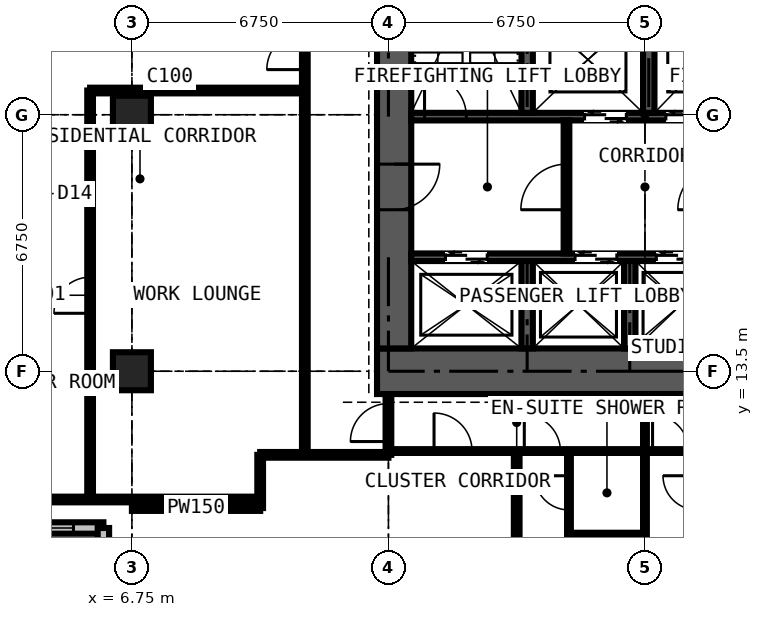
"""IFC4 building model, lengths in metres.
Left out: names, types, materials, properties, quantities, classifications, styles, units other than length and angle.
Written with IfcOpenShell. Run it as: python <this file> out.ifc"""

import sys

from ifc_helpers import new_model, si_unit, direction, frame, frame_2d, origin, origin_2d, place, context, subcontext, project, spatial, rectangle, extrude, element, fill, save


model = new_model("IFC4")
c1 = context("Model", 3, precision=1e-05, world=origin(), true_north=direction((0.0, 1.0)))
c2 = subcontext(c1, "Body", "Model", "MODEL_VIEW")
j1 = project(units=[si_unit("LENGTHUNIT", "METRE"), si_unit("PLANEANGLEUNIT", "RADIAN")], contexts=[c1])
p1 = place(None, origin())
s1 = spatial("IfcSite", under=j1, at=p1, CompositionType="ELEMENT")
p2 = place(p1, origin())
s2 = spatial("IfcBuilding", under=s1, at=p2, CompositionType="ELEMENT")
p3 = place(p2, frame((0.0, 0.0, 233.1)))
s3 = spatial("IfcBuildingStorey", under=s2, at=p3, CompositionType="ELEMENT", Elevation=233.1)
for number, where, z_axis, x_axis in (
    (1, (6.75, 13.5, 0.0), (0.0, 0.0, 1.0), (1.0, 0.0, 0.0)),
    (2, (6.75, 20.25, 0.0), (0.0, 0.0, 1.0), (1.0, 0.0, 0.0)),
):
    element("IfcColumn", number, at=place(p3, frame(where, z_axis=z_axis, x_axis=x_axis)), inside=s3, PredefinedType="COLUMN", context=c2, shape_type="SweptSolid", body=[
        extrude(rectangle(XDim=1.0, YDim=1.0, at=origin_2d()), origin(), (0.0, 0.0, 1.0), 3.6),
    ])
p4 = place(p3, frame((13.2, 13.5, 0.0), z_axis=(0.0, 0.0, 1.0), x_axis=(1.0, 0.0, 0.0)))
e3 = element("IfcWall", 3, at=p4, inside=s3, PredefinedType="SHEAR", context=c2, shape_type="SweptSolid", body=[
    extrude(rectangle(XDim=14.1, YDim=1.2, at=frame_2d((7.05, 0.0))), origin(), (0.0, 0.0, 1.0), 3.6),
])
p5 = place(p3, frame((13.65, 26.4, 0.0), z_axis=(0.0, 0.0, 1.0), x_axis=(0.0, -1.0, 0.0)))
e4 = element("IfcWall", 4, at=p5, inside=s3, PredefinedType="SHEAR", context=c2, shape_type="SweptSolid", body=[
    extrude(rectangle(XDim=12.3, YDim=0.9, at=frame_2d((6.15, 0.0))), origin(), (0.0, 0.0, 1.0), 3.6),
])
p6 = place(p5, frame((7.45, 0.0, 0.0)))
e5 = element("IfcOpeningElement", 5, at=p6, cuts=e4, PredefinedType="OPENING", context=c2, shape_type="SweptSolid", body=[
    extrude(rectangle(XDim=1.2, YDim=2.2, at=frame_2d((0.6, 1.1))), frame((0.0, 0.46, 0.0), z_axis=(0.0, -1.0, 0.0), x_axis=(1.0, 0.0, 0.0)), (0.0, 0.0, 1.0), 0.92),
])
p7 = place(p3, frame((2.625, 9.375, 0.0), z_axis=(0.0, 0.0, 1.0), x_axis=(1.0, 0.0, 0.0)))
e6 = element("IfcWall", 6, at=p7, inside=s3, PredefinedType="SOLIDWALL", context=c2, shape_type="SweptSolid", body=[
    extrude(rectangle(XDim=3.375, YDim=0.3, at=frame_2d((1.688, 0.0))), origin(), (0.0, 0.0, 1.0), 3.375),
])
p8 = place(p7, frame((0.788, 0.0, 0.6)))
e7 = element("IfcOpeningElement", 7, at=p8, cuts=e6, PredefinedType="OPENING", context=c2, shape_type="SweptSolid", body=[
    extrude(rectangle(XDim=1.8, YDim=2.1, at=frame_2d((0.9, 1.05))), frame((0.0, 0.16, 0.0), z_axis=(0.0, -1.0, 0.0), x_axis=(1.0, 0.0, 0.0)), (0.0, 0.0, 1.0), 0.32),
])
p9 = place(p3, frame((6.0, 9.375, 0.0), z_axis=(0.0, 0.0, 1.0), x_axis=(0.0, -1.0, 0.0)))
e8 = element("IfcWall", 8, at=p9, inside=s3, PredefinedType="SOLIDWALL", context=c2, shape_type="SweptSolid", body=[
    extrude(rectangle(XDim=3.375, YDim=0.3, at=frame_2d((1.688, 0.0))), origin(), (0.0, 0.0, 1.0), 3.375),
])
p10 = place(p9, frame((0.788, 0.0, 0.6)))
e9 = element("IfcOpeningElement", 9, at=p10, cuts=e8, PredefinedType="OPENING", context=c2, shape_type="SweptSolid", body=[
    extrude(rectangle(XDim=1.8, YDim=2.1, at=frame_2d((0.9, 1.05))), frame((0.0, 0.16, 0.0), z_axis=(0.0, -1.0, 0.0), x_axis=(1.0, 0.0, 0.0)), (0.0, 0.0, 1.0), 0.32),
])
p11 = place(p3, frame((14.1, 16.5, 0.0), z_axis=(0.0, 0.0, 1.0), x_axis=(1.0, 0.0, 0.0)))
e10 = element("IfcWall", 10, at=p11, inside=s3, PredefinedType="SHEAR", context=c2, shape_type="SweptSolid", body=[
    extrude(rectangle(XDim=12.3, YDim=0.2, at=frame_2d((6.15, 0.0))), origin(), (0.0, 0.0, 1.0), 3.6),
])
p12 = place(p11, frame((0.9, 0.0, 0.0)))
e11 = element("IfcOpeningElement", 11, at=p12, cuts=e10, PredefinedType="OPENING", context=c2, shape_type="SweptSolid", body=[
    extrude(rectangle(XDim=1.1, YDim=2.2, at=frame_2d((0.55, 1.1))), frame((0.0, 0.11, 0.0), z_axis=(0.0, -1.0, 0.0), x_axis=(1.0, 0.0, 0.0)), (0.0, 0.0, 1.0), 0.22),
])
p13 = place(p11, frame((4.31, 0.0, 0.0)))
e12 = element("IfcOpeningElement", 12, at=p13, cuts=e10, PredefinedType="OPENING", context=c2, shape_type="SweptSolid", body=[
    extrude(rectangle(XDim=1.1, YDim=2.2, at=frame_2d((0.55, 1.1))), frame((0.0, 0.11, 0.0), z_axis=(0.0, -1.0, 0.0), x_axis=(1.0, 0.0, 0.0)), (0.0, 0.0, 1.0), 0.22),
])
p14 = place(p11, frame((6.45, 0.0, 0.0)))
e13 = element("IfcOpeningElement", 13, at=p14, cuts=e10, PredefinedType="OPENING", context=c2, shape_type="SweptSolid", body=[
    extrude(rectangle(XDim=1.1, YDim=2.2, at=frame_2d((0.55, 1.1))), frame((0.0, 0.11, 0.0), z_axis=(0.0, -1.0, 0.0), x_axis=(1.0, 0.0, 0.0)), (0.0, 0.0, 1.0), 0.22),
])
p15 = place(p11, frame((9.5, 0.0, 0.0)))
e14 = element("IfcOpeningElement", 14, at=p15, cuts=e10, PredefinedType="OPENING", context=c2, shape_type="SweptSolid", body=[
    extrude(rectangle(XDim=1.1, YDim=2.2, at=frame_2d((0.55, 1.1))), frame((0.0, 0.11, 0.0), z_axis=(0.0, -1.0, 0.0), x_axis=(1.0, 0.0, 0.0)), (0.0, 0.0, 1.0), 0.22),
])
p16 = place(p3, frame((14.1, 20.2, 0.0), z_axis=(0.0, 0.0, 1.0), x_axis=(1.0, 0.0, 0.0)))
e15 = element("IfcWall", 15, at=p16, inside=s3, PredefinedType="SHEAR", context=c2, shape_type="SweptSolid", body=[
    extrude(rectangle(XDim=12.3, YDim=0.2, at=frame_2d((6.15, 0.0))), origin(), (0.0, 0.0, 1.0), 3.6),
])
p17 = place(p16, frame((4.56, 0.0, 0.0)))
e16 = element("IfcOpeningElement", 16, at=p17, cuts=e15, PredefinedType="OPENING", context=c2, shape_type="SweptSolid", body=[
    extrude(rectangle(XDim=1.1, YDim=2.2, at=frame_2d((0.55, 1.1))), frame((0.0, 0.11, 0.0), z_axis=(0.0, -1.0, 0.0), x_axis=(1.0, 0.0, 0.0)), (0.0, 0.0, 1.0), 0.22),
])
p18 = place(p16, frame((6.7, 0.0, 0.0)))
e17 = element("IfcOpeningElement", 17, at=p18, cuts=e15, PredefinedType="OPENING", context=c2, shape_type="SweptSolid", body=[
    extrude(rectangle(XDim=1.1, YDim=2.2, at=frame_2d((0.55, 1.1))), frame((0.0, 0.11, 0.0), z_axis=(0.0, -1.0, 0.0), x_axis=(1.0, 0.0, 0.0)), (0.0, 0.0, 1.0), 0.22),
])
p19 = place(p16, frame((0.35, 0.0, 0.0)))
e18 = element("IfcOpeningElement", 18, at=p19, cuts=e15, PredefinedType="OPENING", context=c2, shape_type="SweptSolid", body=[
    extrude(rectangle(XDim=1.1, YDim=2.2, at=frame_2d((0.55, 1.1))), frame((0.0, 0.11, 0.0), z_axis=(0.0, -1.0, 0.0), x_axis=(1.0, 0.0, 0.0)), (0.0, 0.0, 1.0), 0.22),
])
p20 = place(p16, frame((9.75, 0.0, 0.0)))
e19 = element("IfcOpeningElement", 19, at=p20, cuts=e15, PredefinedType="OPENING", context=c2, shape_type="SweptSolid", body=[
    extrude(rectangle(XDim=1.1, YDim=2.2, at=frame_2d((0.55, 1.1))), frame((0.0, 0.11, 0.0), z_axis=(0.0, -1.0, 0.0), x_axis=(1.0, 0.0, 0.0)), (0.0, 0.0, 1.0), 0.22),
])
p21 = place(p3, frame((17.15, 20.3, 0.0), z_axis=(0.0, 0.0, 1.0), x_axis=(0.0, 1.0, 0.0)))
e20 = element("IfcWall", 20, at=p21, inside=s3, PredefinedType="SHEAR", context=c2, shape_type="SweptSolid", body=[
    extrude(rectangle(XDim=6.1, YDim=0.3, at=frame_2d((3.05, 0.0))), origin(), (0.0, 0.0, 1.0), 3.6),
])
p22 = place(p3, frame((20.35, 20.3, 0.0), z_axis=(0.0, 0.0, 1.0), x_axis=(0.0, 1.0, 0.0)))
e21 = element("IfcWall", 21, at=p22, inside=s3, PredefinedType="SHEAR", context=c2, shape_type="SweptSolid", body=[
    extrude(rectangle(XDim=2.8, YDim=0.3, at=frame_2d((1.4, 0.0))), origin(), (0.0, 0.0, 1.0), 3.6),
])
for number, where, z_axis, x_axis in (
    (22, (17.15, 14.1, 0.0), (0.0, 0.0, 1.0), (0.0, 1.0, 0.0)),
    (23, (19.85, 14.1, 0.0), (0.0, 0.0, 1.0), (0.0, 1.0, 0.0)),
):
    element("IfcWall", number, at=place(p3, frame(where, z_axis=z_axis, x_axis=x_axis)), inside=s3, PredefinedType="SHEAR", context=c2, shape_type="SweptSolid", body=[
        extrude(rectangle(XDim=2.3, YDim=0.3, at=frame_2d((1.15, 0.0))), origin(), (0.0, 0.0, 1.0), 3.6),
    ])
p23 = place(p3, frame((18.185, 16.6, 0.0), z_axis=(0.0, 0.0, 1.0), x_axis=(0.0, 1.0, 0.0)))
e24 = element("IfcWall", 24, at=p23, inside=s3, PredefinedType="PARTITIONING", context=c2, shape_type="SweptSolid", body=[
    extrude(rectangle(XDim=3.5, YDim=0.15, at=frame_2d((1.75, 0.0))), origin(), (0.0, 0.0, 1.0), 3.375),
])
p24 = place(p23, frame((1.15, 0.0, 0.0)))
e25 = element("IfcOpeningElement", 25, at=p24, cuts=e24, PredefinedType="OPENING", context=c2, shape_type="SweptSolid", body=[
    extrude(rectangle(XDim=1.2, YDim=2.2, at=frame_2d((0.6, 1.1))), frame((0.0, 0.085, 0.0), z_axis=(0.0, -1.0, 0.0), x_axis=(1.0, 0.0, 0.0)), (0.0, 0.0, 1.0), 0.17),
])
p25 = place(p3, frame((2.775, 10.125, 0.0), z_axis=(0.0, 0.0, 1.0), x_axis=(1.0, 0.0, 0.0)))
e26 = element("IfcWall", 26, at=p25, inside=s3, PredefinedType="PARTITIONING", context=c2, shape_type="SweptSolid", body=[
    extrude(rectangle(XDim=7.35, YDim=0.15, at=frame_2d((3.675, 0.0))), origin(), (0.0, 0.0, 1.0), 2.877),
])
p26 = place(p3, frame((5.65, 10.125, 0.0), z_axis=(0.0, 0.0, 1.0), x_axis=(0.0, 1.0, 0.0)))
e27 = element("IfcWall", 27, at=p26, inside=s3, PredefinedType="PARTITIONING", context=c2, shape_type="SweptSolid", body=[
    extrude(rectangle(XDim=10.762, YDim=0.15, at=frame_2d((5.381, 0.0))), origin(), (0.0, 0.0, 1.0), 3.375),
])
p27 = place(p26, frame((4.9, 0.0, 0.0)))
e28 = element("IfcOpeningElement", 28, at=p27, cuts=e27, PredefinedType="OPENING", context=c2, shape_type="SweptSolid", body=[
    extrude(rectangle(XDim=0.95, YDim=2.2, at=frame_2d((0.475, 1.1))), frame((0.0, 0.085, 0.0), z_axis=(0.0, -1.0, 0.0), x_axis=(1.0, 0.0, 0.0)), (0.0, 0.0, 1.0), 0.17),
])
p28 = place(p3, frame((5.65, 20.887, 0.0), z_axis=(0.0, 0.0, 1.0), x_axis=(1.0, 0.0, 0.0)))
e29 = element("IfcWall", 29, at=p28, inside=s3, PredefinedType="PARTITIONING", context=c2, shape_type="SweptSolid", body=[
    extrude(rectangle(XDim=5.65, YDim=0.15, at=frame_2d((2.825, 0.0))), origin(), (0.0, 0.0, 1.0), 3.375),
])
p29 = place(p3, frame((6.75, 9.9, 0.0), z_axis=(0.0, 0.0, 1.0), x_axis=(1.0, 0.0, 0.0)))
e30 = element("IfcWall", 30, at=p29, inside=s3, PredefinedType="PARTITIONING", context=c2, shape_type="SweptSolid", body=[
    extrude(rectangle(XDim=3.375, YDim=0.15, at=frame_2d((1.688, 0.0))), origin(), (0.0, 0.0, 1.0), 3.375),
])
p30 = place(p3, frame((10.125, 9.9, 0.0), z_axis=(0.0, 0.0, 1.0), x_axis=(0.0, 1.0, 0.0)))
e31 = element("IfcWall", 31, at=p30, inside=s3, PredefinedType="PARTITIONING", context=c2, shape_type="SweptSolid", body=[
    extrude(rectangle(XDim=1.4, YDim=0.15, at=frame_2d((0.7, 0.0))), origin(), (0.0, 0.0, 1.0), 3.375),
])
p31 = place(p3, frame((10.125, 11.3, 0.0), z_axis=(0.0, 0.0, 1.0), x_axis=(1.0, 0.0, 0.0)))
e32 = element("IfcWall", 32, at=p31, inside=s3, PredefinedType="PARTITIONING", context=c2, shape_type="SweptSolid", body=[
    extrude(rectangle(XDim=3.375, YDim=0.15, at=frame_2d((1.688, 0.0))), origin(), (0.0, 0.0, 1.0), 3.375),
])
p32 = place(p3, frame((11.3, 11.3, 0.0), z_axis=(0.0, 0.0, 1.0), x_axis=(0.0, 1.0, 0.0)))
e33 = element("IfcWall", 33, at=p32, inside=s3, PredefinedType="PARTITIONING", context=c2, shape_type="SweptSolid", body=[
    extrude(rectangle(XDim=19.3, YDim=0.15, at=frame_2d((9.65, 0.0))), origin(), (0.0, 0.0, 1.0), 3.375),
])
p33 = place(p32, frame((18.1, 0.0, 0.0)))
e34 = element("IfcOpeningElement", 34, at=p33, cuts=e33, PredefinedType="OPENING", context=c2, shape_type="SweptSolid", body=[
    extrude(rectangle(XDim=1.0, YDim=2.2, at=frame_2d((0.5, 1.1))), frame((0.0, 0.085, 0.0), z_axis=(0.0, -1.0, 0.0), x_axis=(1.0, 0.0, 0.0)), (0.0, 0.0, 1.0), 0.17),
])
p34 = place(p32, frame((10.137, 0.0, 0.0)))
e35 = element("IfcOpeningElement", 35, at=p34, cuts=e33, PredefinedType="OPENING", context=c2, shape_type="SweptSolid", body=[
    extrude(rectangle(XDim=1.0, YDim=2.2, at=frame_2d((0.5, 1.1))), frame((0.0, 0.085, 0.0), z_axis=(0.0, -1.0, 0.0), x_axis=(1.0, 0.0, 0.0)), (0.0, 0.0, 1.0), 0.17),
])
p35 = place(p3, frame((13.5, 11.3, 0.0), z_axis=(0.0, 0.0, 1.0), x_axis=(0.0, 1.0, 0.0)))
e36 = element("IfcWall", 36, at=p35, inside=s3, PredefinedType="PARTITIONING", context=c2, shape_type="SweptSolid", body=[
    extrude(rectangle(XDim=1.6, YDim=0.15, at=frame_2d((0.8, 0.0))), origin(), (0.0, 0.0, 1.0), 2.877),
])
p36 = place(p35, frame((0.35, 0.0, 0.0)))
e37 = element("IfcOpeningElement", 37, at=p36, cuts=e36, PredefinedType="OPENING", context=c2, shape_type="SweptSolid", body=[
    extrude(rectangle(XDim=1.0, YDim=2.2, at=frame_2d((0.5, 1.1))), frame((0.0, 0.085, 0.0), z_axis=(0.0, -1.0, 0.0), x_axis=(1.0, 0.0, 0.0)), (0.0, 0.0, 1.0), 0.17),
])
p37 = place(p3, frame((13.5, 11.4, 0.0), z_axis=(0.0, 0.0, 1.0), x_axis=(1.0, 0.0, 0.0)))
e38 = element("IfcWall", 38, at=p37, inside=s3, PredefinedType="PARTITIONING", context=c2, shape_type="SweptSolid", body=[
    extrude(rectangle(XDim=10.125, YDim=0.1, at=frame_2d((5.062, 0.0))), origin(), (0.0, 0.0, 1.0), 3.375),
])
p38 = place(p37, frame((1.2, 0.0, 0.0)))
e39 = element("IfcOpeningElement", 39, at=p38, cuts=e38, PredefinedType="OPENING", context=c2, shape_type="SweptSolid", body=[
    extrude(rectangle(XDim=1.0, YDim=2.2, at=frame_2d((0.5, 1.1))), frame((0.0, 0.06, 0.0), z_axis=(0.0, -1.0, 0.0), x_axis=(1.0, 0.0, 0.0)), (0.0, 0.0, 1.0), 0.12),
])
p39 = place(p37, frame((3.575, 0.0, 0.0)))
e40 = element("IfcOpeningElement", 40, at=p39, cuts=e38, PredefinedType="OPENING", context=c2, shape_type="SweptSolid", body=[
    extrude(rectangle(XDim=0.95, YDim=2.2, at=frame_2d((0.475, 1.1))), frame((0.0, 0.06, 0.0), z_axis=(0.0, -1.0, 0.0), x_axis=(1.0, 0.0, 0.0)), (0.0, 0.0, 1.0), 0.12),
])
p40 = place(p37, frame((6.95, 0.0, 0.0)))
e41 = element("IfcOpeningElement", 41, at=p40, cuts=e38, PredefinedType="OPENING", context=c2, shape_type="SweptSolid", body=[
    extrude(rectangle(XDim=0.95, YDim=2.2, at=frame_2d((0.475, 1.1))), frame((0.0, 0.06, 0.0), z_axis=(0.0, -1.0, 0.0), x_axis=(1.0, 0.0, 0.0)), (0.0, 0.0, 1.0), 0.12),
])
p41 = place(p3, frame((16.875, 6.016, 0.0), z_axis=(0.0, 0.0, 1.0), x_axis=(0.0, 1.0, 0.0)))
e42 = element("IfcWall", 42, at=p41, inside=s3, PredefinedType="PARTITIONING", context=c2, shape_type="SweptSolid", body=[
    extrude(rectangle(XDim=5.384, YDim=0.15, at=frame_2d((2.692, 0.0))), origin(), (0.0, 0.0, 1.0), 3.375),
])
p42 = place(p3, frame((18.25, 9.2, 0.0), z_axis=(0.0, 0.0, 1.0), x_axis=(0.0, 1.0, 0.0)))
e43 = element("IfcWall", 43, at=p42, inside=s3, PredefinedType="PARTITIONING", context=c2, shape_type="SweptSolid", body=[
    extrude(rectangle(XDim=2.2, YDim=0.1, at=frame_2d((1.1, 0.0))), origin(), (0.0, 0.0, 1.0), 3.375),
])
p43 = place(p42, frame((0.65, 0.0, 0.0)))
e44 = element("IfcOpeningElement", 44, at=p43, cuts=e43, PredefinedType="OPENING", context=c2, shape_type="SweptSolid", body=[
    extrude(rectangle(XDim=0.9, YDim=2.2, at=frame_2d((0.45, 1.1))), frame((0.0, 0.06, 0.0), z_axis=(0.0, -1.0, 0.0), x_axis=(1.0, 0.0, 0.0)), (0.0, 0.0, 1.0), 0.12),
])
p44 = place(p3, frame((18.25, 9.2, 0.0), z_axis=(0.0, 0.0, 1.0), x_axis=(1.0, 0.0, 0.0)))
e45 = element("IfcWall", 45, at=p44, inside=s3, PredefinedType="PARTITIONING", context=c2, shape_type="SweptSolid", body=[
    extrude(rectangle(XDim=2.0, YDim=0.1, at=frame_2d((1.0, 0.0))), origin(), (0.0, 0.0, 1.0), 3.375),
])
p45 = place(p3, frame((20.25, 6.016, 0.0), z_axis=(0.0, 0.0, 1.0), x_axis=(0.0, 1.0, 0.0)))
e46 = element("IfcWall", 46, at=p45, inside=s3, PredefinedType="PARTITIONING", context=c2, shape_type="SweptSolid", body=[
    extrude(rectangle(XDim=6.884, YDim=0.1, at=frame_2d((3.442, 0.0))), origin(), (0.0, 0.0, 1.0), 2.877),
])
p46 = place(p8, origin())
e47 = element("IfcWindow", 47, at=p46, inside=s3, PartitioningType="SINGLE_PANEL", PredefinedType="WINDOW", context=c2, shape_type="SweptSolid", body=[
    extrude(rectangle(XDim=1.8, YDim=2.1, at=frame_2d((0.9, 1.05))), frame((0.0, 0.03, 0.0), z_axis=(0.0, -1.0, 0.0), x_axis=(1.0, 0.0, 0.0)), (0.0, 0.0, 1.0), 0.06),
])
fill(e7, e47)
p47 = place(p12, origin())
e48 = element("IfcDoor", 48, at=p47, inside=s3, OperationType="DOUBLE_DOOR_SLIDING", PredefinedType="DOOR", context=c2, shape_type="SweptSolid", body=[
    extrude(rectangle(XDim=1.1, YDim=2.2, at=frame_2d((0.55, 1.1))), frame((0.0, 0.025, 0.0), z_axis=(0.0, -1.0, 0.0), x_axis=(1.0, 0.0, 0.0)), (0.0, 0.0, 1.0), 0.05),
])
fill(e11, e48)
p48 = place(p13, origin())
e49 = element("IfcDoor", 49, at=p48, inside=s3, OperationType="DOUBLE_DOOR_SLIDING", PredefinedType="DOOR", context=c2, shape_type="SweptSolid", body=[
    extrude(rectangle(XDim=1.1, YDim=2.2, at=frame_2d((0.55, 1.1))), frame((0.0, 0.025, 0.0), z_axis=(0.0, -1.0, 0.0), x_axis=(1.0, 0.0, 0.0)), (0.0, 0.0, 1.0), 0.05),
])
fill(e12, e49)
p49 = place(p14, origin())
e50 = element("IfcDoor", 50, at=p49, inside=s3, OperationType="DOUBLE_DOOR_SLIDING", PredefinedType="DOOR", context=c2, shape_type="SweptSolid", body=[
    extrude(rectangle(XDim=1.1, YDim=2.2, at=frame_2d((0.55, 1.1))), frame((0.0, 0.025, 0.0), z_axis=(0.0, -1.0, 0.0), x_axis=(1.0, 0.0, 0.0)), (0.0, 0.0, 1.0), 0.05),
])
fill(e13, e50)
p50 = place(p17, origin())
e51 = element("IfcDoor", 51, at=p50, inside=s3, OperationType="DOUBLE_DOOR_SLIDING", PredefinedType="DOOR", context=c2, shape_type="SweptSolid", body=[
    extrude(rectangle(XDim=1.1, YDim=2.2, at=frame_2d((0.55, 1.1))), frame((0.0, 0.025, 0.0), z_axis=(0.0, -1.0, 0.0), x_axis=(1.0, 0.0, 0.0)), (0.0, 0.0, 1.0), 0.05),
])
fill(e16, e51)
p51 = place(p18, origin())
e52 = element("IfcDoor", 52, at=p51, inside=s3, OperationType="DOUBLE_DOOR_SLIDING", PredefinedType="DOOR", context=c2, shape_type="SweptSolid", body=[
    extrude(rectangle(XDim=1.1, YDim=2.2, at=frame_2d((0.55, 1.1))), frame((0.0, 0.025, 0.0), z_axis=(0.0, -1.0, 0.0), x_axis=(1.0, 0.0, 0.0)), (0.0, 0.0, 1.0), 0.05),
])
fill(e17, e52)
p52 = place(p6, origin())
e53 = element("IfcDoor", 53, at=p52, inside=s3, OperationType="DOUBLE_DOOR_SINGLE_SWING", PredefinedType="DOOR", context=c2, shape_type="SweptSolid", body=[
    extrude(rectangle(XDim=1.2, YDim=2.2, at=frame_2d((0.6, 1.1))), frame((0.0, 0.025, 0.0), z_axis=(0.0, -1.0, 0.0), x_axis=(1.0, 0.0, 0.0)), (0.0, 0.0, 1.0), 0.05),
])
fill(e5, e53)
p53 = place(p24, origin())
e54 = element("IfcDoor", 54, at=p53, inside=s3, OperationType="DOUBLE_DOOR_SINGLE_SWING", PredefinedType="DOOR", context=c2, shape_type="SweptSolid", body=[
    extrude(rectangle(XDim=1.2, YDim=2.2, at=frame_2d((0.6, 1.1))), frame((0.0, 0.025, 0.0), z_axis=(0.0, -1.0, 0.0), x_axis=(1.0, 0.0, 0.0)), (0.0, 0.0, 1.0), 0.05),
])
fill(e25, e54)
p54 = place(p19, origin())
e55 = element("IfcDoor", 55, at=p54, inside=s3, OperationType="SINGLE_SWING_LEFT", PredefinedType="DOOR", context=c2, shape_type="SweptSolid", body=[
    extrude(rectangle(XDim=1.1, YDim=2.2, at=frame_2d((0.55, 1.1))), frame((0.0, 0.025, 0.0), z_axis=(0.0, -1.0, 0.0), x_axis=(1.0, 0.0, 0.0)), (0.0, 0.0, 1.0), 0.05),
])
fill(e18, e55)
p55 = place(p38, origin())
e56 = element("IfcDoor", 56, at=p55, inside=s3, OperationType="SINGLE_SWING_LEFT", PredefinedType="DOOR", context=c2, shape_type="SweptSolid", body=[
    extrude(rectangle(XDim=1.0, YDim=2.2, at=frame_2d((0.5, 1.1))), frame((0.0, 0.025, 0.0), z_axis=(0.0, -1.0, 0.0), x_axis=(1.0, 0.0, 0.0)), (0.0, 0.0, 1.0), 0.05),
])
fill(e39, e56)
p56 = place(p39, origin())
e57 = element("IfcDoor", 57, at=p56, inside=s3, OperationType="SINGLE_SWING_LEFT", PredefinedType="DOOR", context=c2, shape_type="SweptSolid", body=[
    extrude(rectangle(XDim=0.95, YDim=2.2, at=frame_2d((0.475, 1.1))), frame((0.0, 0.025, 0.0), z_axis=(0.0, -1.0, 0.0), x_axis=(1.0, 0.0, 0.0)), (0.0, 0.0, 1.0), 0.05),
])
fill(e40, e57)
p57 = place(p43, origin())
e58 = element("IfcDoor", 58, at=p57, inside=s3, OperationType="SINGLE_SWING_RIGHT", PredefinedType="DOOR", context=c2, shape_type="SweptSolid", body=[
    extrude(rectangle(XDim=0.9, YDim=2.2, at=frame_2d((0.45, 1.1))), frame((0.0, 0.025, 0.0), z_axis=(0.0, -1.0, 0.0), x_axis=(1.0, 0.0, 0.0)), (0.0, 0.0, 1.0), 0.05),
])
fill(e44, e58)
p58 = place(p36, origin())
e59 = element("IfcDoor", 59, at=p58, inside=s3, OperationType="SINGLE_SWING_LEFT", PredefinedType="DOOR", context=c2, shape_type="SweptSolid", body=[
    extrude(rectangle(XDim=1.0, YDim=2.2, at=frame_2d((0.5, 1.1))), frame((0.0, 0.025, 0.0), z_axis=(0.0, -1.0, 0.0), x_axis=(1.0, 0.0, 0.0)), (0.0, 0.0, 1.0), 0.05),
])
fill(e37, e59)
p59 = place(p40, origin())
e60 = element("IfcDoor", 60, at=p59, inside=s3, OperationType="SINGLE_SWING_LEFT", PredefinedType="DOOR", context=c2, shape_type="SweptSolid", body=[
    extrude(rectangle(XDim=0.95, YDim=2.2, at=frame_2d((0.475, 1.1))), frame((0.0, 0.025, 0.0), z_axis=(0.0, -1.0, 0.0), x_axis=(1.0, 0.0, 0.0)), (0.0, 0.0, 1.0), 0.05),
])
fill(e41, e60)
p60 = place(p34, origin())
e61 = element("IfcDoor", 61, at=p60, inside=s3, OperationType="SINGLE_SWING_LEFT", PredefinedType="DOOR", context=c2, shape_type="SweptSolid", body=[
    extrude(rectangle(XDim=1.0, YDim=2.2, at=frame_2d((0.5, 1.1))), frame((0.0, 0.025, 0.0), z_axis=(0.0, -1.0, 0.0), x_axis=(1.0, 0.0, 0.0)), (0.0, 0.0, 1.0), 0.05),
])
fill(e35, e61)
p61 = place(p27, origin())
e62 = element("IfcDoor", 62, at=p61, inside=s3, OperationType="SINGLE_SWING_LEFT", PredefinedType="DOOR", context=c2, shape_type="SweptSolid", body=[
    extrude(rectangle(XDim=0.95, YDim=2.2, at=frame_2d((0.475, 1.1))), frame((0.0, 0.025, 0.0), z_axis=(0.0, -1.0, 0.0), x_axis=(1.0, 0.0, 0.0)), (0.0, 0.0, 1.0), 0.05),
])
fill(e28, e62)
save(model, sys.argv[1])
